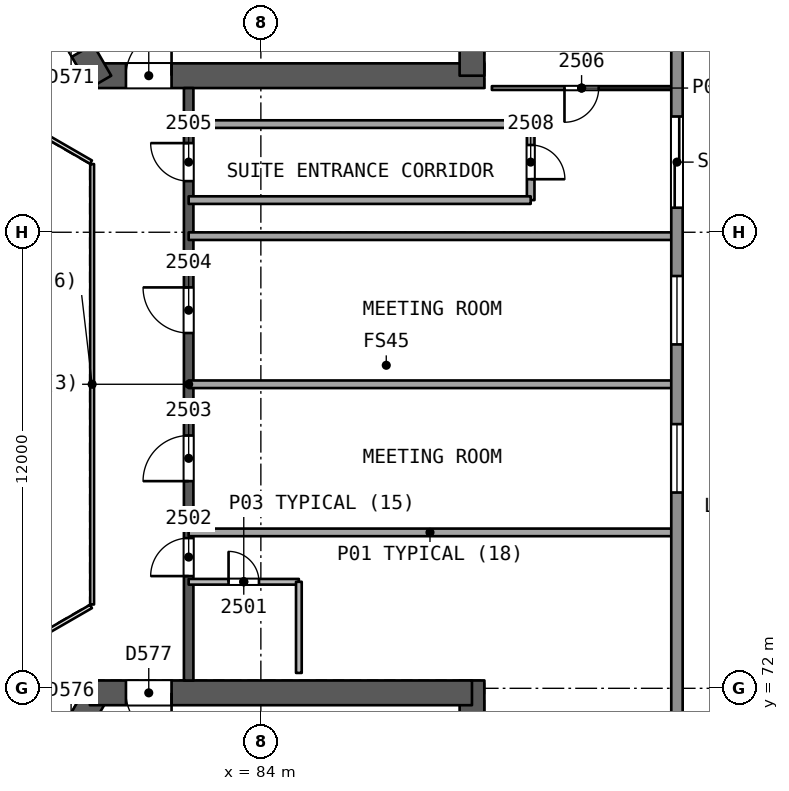
"""IFC4 building model, lengths in metres.
Left out: names, types, materials, properties, quantities, classifications, styles, units other than length and angle.
Written with IfcOpenShell. Run it as: python <this file> out.ifc"""

import sys

from ifc_helpers import new_model, si_unit, direction, frame, frame_2d, origin, place, context, subcontext, project, spatial, rectangle, extrude, element, fill, save


model = new_model("IFC4")
c1 = context("Model", 3, precision=1e-05, world=origin(), true_north=direction((0.0, 1.0)))
c2 = subcontext(c1, "Body", "Model", "MODEL_VIEW")
j1 = project(units=[si_unit("LENGTHUNIT", "METRE"), si_unit("PLANEANGLEUNIT", "RADIAN")], contexts=[c1])
p1 = place(None, origin())
s1 = spatial("IfcSite", under=j1, at=p1, CompositionType="ELEMENT")
p2 = place(p1, origin())
s2 = spatial("IfcBuilding", under=s1, at=p2, CompositionType="ELEMENT")
p3 = place(p2, frame((0.0, 0.0, 106.8)))
s3 = spatial("IfcBuildingStorey", under=s2, at=p3, CompositionType="ELEMENT", Elevation=106.8)
p4 = place(p3, frame((79.688, 88.119, 0.0), z_axis=(0.0, 0.0, 1.0), x_axis=(1.0, 0.0, 0.0)))
e1 = element("IfcWall", 1, at=p4, inside=s3, PredefinedType="SHEAR", context=c2, shape_type="SweptSolid", body=[
    extrude(rectangle(XDim=10.192, YDim=0.65, at=frame_2d((5.096, 0.0))), origin(), (0.0, 0.0, 1.0), 3.7),
])
p5 = place(p4, frame((0.762, 0.0, 0.0)))
e2 = element("IfcOpeningElement", 2, at=p5, cuts=e1, PredefinedType="OPENING", context=c2, shape_type="SweptSolid", body=[
    extrude(rectangle(XDim=1.2, YDim=2.1, at=frame_2d((0.6, 1.05))), frame((0.0, 0.335, 0.0), z_axis=(0.0, -1.0, 0.0), x_axis=(1.0, 0.0, 0.0)), (0.0, 0.0, 1.0), 0.671),
])
p6 = place(p3, frame((89.555, 88.119, 0.0), z_axis=(0.0, 0.0, 1.0), x_axis=(0.0, 1.0, 0.0)))
e3 = element("IfcWall", 3, at=p6, inside=s3, PredefinedType="SHEAR", context=c2, shape_type="SweptSolid", body=[
    extrude(rectangle(XDim=14.009, YDim=0.65, at=frame_2d((7.004, 0.0))), origin(), (0.0, 0.0, 1.0), 3.7),
])
p7 = place(p3, frame((74.754, 96.665, 0.0), z_axis=(0.0, 0.0, 1.0), x_axis=(0.500011799426, -0.866018591275, 0.0)))
e4 = element("IfcWall", 4, at=p7, inside=s3, PredefinedType="SHEAR", context=c2, shape_type="SweptSolid", body=[
    extrude(rectangle(XDim=10.055, YDim=0.65, at=frame_2d((5.027, 0.0))), origin(), (0.0, 0.0, 1.0), 3.7),
])
p8 = place(p7, frame((7.905, 0.0, 0.0)))
e5 = element("IfcOpeningElement", 5, at=p8, cuts=e4, PredefinedType="OPENING", context=c2, shape_type="SweptSolid", body=[
    extrude(rectangle(XDim=1.2, YDim=2.1, at=frame_2d((0.6, 1.05))), frame((0.0, 0.335, 0.0), z_axis=(0.0, -1.0, 0.0), x_axis=(1.0, 0.0, 0.0)), (0.0, 0.0, 1.0), 0.671),
])
p9 = place(p3, frame((79.688, 71.881, 0.0), z_axis=(0.0, 0.0, 1.0), x_axis=(-0.49999822179, -0.866026430432, 0.0)))
e6 = element("IfcWall", 6, at=p9, inside=s3, PredefinedType="SHEAR", context=c2, shape_type="SweptSolid", body=[
    extrude(rectangle(XDim=10.192, YDim=0.65, at=frame_2d((5.096, 0.0))), origin(), (0.0, 0.0, 1.0), 3.7),
])
p10 = place(p9, frame((0.762, 0.0, 0.0)))
e7 = element("IfcOpeningElement", 7, at=p10, cuts=e6, PredefinedType="OPENING", context=c2, shape_type="SweptSolid", body=[
    extrude(rectangle(XDim=1.2, YDim=2.1, at=frame_2d((0.6, 1.05))), frame((0.0, 0.335, 0.0), z_axis=(0.0, -1.0, 0.0), x_axis=(1.0, 0.0, 0.0)), (0.0, 0.0, 1.0), 0.671),
])
p11 = place(p3, frame((89.555, 58.06, 0.0), z_axis=(0.0, 0.0, 1.0), x_axis=(0.0, 1.0, 0.0)))
e8 = element("IfcWall", 8, at=p11, inside=s3, PredefinedType="SHEAR", context=c2, shape_type="SweptSolid", body=[
    extrude(rectangle(XDim=14.146, YDim=0.65, at=frame_2d((7.073, 0.0))), origin(), (0.0, 0.0, 1.0), 3.7),
])
p12 = place(p3, frame((89.555, 71.881, 0.0), z_axis=(0.0, 0.0, 1.0), x_axis=(-1.0, 0.0, 0.0)))
e9 = element("IfcWall", 9, at=p12, inside=s3, PredefinedType="SHEAR", context=c2, shape_type="SweptSolid", body=[
    extrude(rectangle(XDim=10.055, YDim=0.65, at=frame_2d((5.027, 0.0))), origin(), (0.0, 0.0, 1.0), 3.7),
])
p13 = place(p12, frame((7.905, 0.0, 0.0)))
e10 = element("IfcOpeningElement", 10, at=p13, cuts=e9, PredefinedType="OPENING", context=c2, shape_type="SweptSolid", body=[
    extrude(rectangle(XDim=1.2, YDim=2.1, at=frame_2d((0.6, 1.05))), frame((0.0, 0.335, 0.0), z_axis=(0.0, -1.0, 0.0), x_axis=(1.0, 0.0, 0.0)), (0.0, 0.0, 1.0), 0.671),
])
p14 = place(p3, frame((82.1, 72.206, 0.0), z_axis=(0.0, 0.0, 1.0), x_axis=(0.0, 1.0, 0.0)))
e11 = element("IfcWall", 11, at=p14, inside=s3, PredefinedType="SHEAR", context=c2, shape_type="SweptSolid", body=[
    extrude(rectangle(XDim=15.588, YDim=0.25, at=frame_2d((7.794, 0.0))), origin(), (0.0, 0.0, 1.0), 3.25),
])
p15 = place(p14, frame((2.747, 0.0, 0.0)))
e12 = element("IfcOpeningElement", 12, at=p15, cuts=e11, PredefinedType="OPENING", context=c2, shape_type="SweptSolid", body=[
    extrude(rectangle(XDim=1.0, YDim=2.1, at=frame_2d((0.5, 1.05))), frame((0.0, 0.135, 0.0), z_axis=(0.0, -1.0, 0.0), x_axis=(1.0, 0.0, 0.0)), (0.0, 0.0, 1.0), 0.271),
])
p16 = place(p14, frame((5.246, 0.0, 0.0)))
e13 = element("IfcOpeningElement", 13, at=p16, cuts=e11, PredefinedType="OPENING", context=c2, shape_type="SweptSolid", body=[
    extrude(rectangle(XDim=1.2, YDim=2.4, at=frame_2d((0.6, 1.2))), frame((0.0, 0.135, 0.0), z_axis=(0.0, -1.0, 0.0), x_axis=(1.0, 0.0, 0.0)), (0.0, 0.0, 1.0), 0.271),
])
p17 = place(p14, frame((9.143, 0.0, 0.0)))
e14 = element("IfcOpeningElement", 14, at=p17, cuts=e11, PredefinedType="OPENING", context=c2, shape_type="SweptSolid", body=[
    extrude(rectangle(XDim=1.2, YDim=2.4, at=frame_2d((0.6, 1.2))), frame((0.0, 0.135, 0.0), z_axis=(0.0, -1.0, 0.0), x_axis=(1.0, 0.0, 0.0)), (0.0, 0.0, 1.0), 0.271),
])
p18 = place(p14, frame((13.14, 0.0, 0.0)))
e15 = element("IfcOpeningElement", 15, at=p18, cuts=e11, PredefinedType="OPENING", context=c2, shape_type="SweptSolid", body=[
    extrude(rectangle(XDim=1.0, YDim=2.1, at=frame_2d((0.5, 1.05))), frame((0.0, 0.135, 0.0), z_axis=(0.0, -1.0, 0.0), x_axis=(1.0, 0.0, 0.0)), (0.0, 0.0, 1.0), 0.271),
])
p19 = place(p3, frame((82.1, 74.803, 0.0), z_axis=(0.0, 0.0, 1.0), x_axis=(1.0, 0.0, 0.0)))
e16 = element("IfcWall", 16, at=p19, inside=s3, PredefinedType="PARTITIONING", context=c2, shape_type="SweptSolid", body=[
    extrude(rectangle(XDim=2.9, YDim=0.15, at=frame_2d((1.45, 0.0))), origin(), (0.0, 0.0, 1.0), 3.25),
])
p20 = place(p19, frame((1.05, 0.0, 0.0)))
e17 = element("IfcOpeningElement", 17, at=p20, cuts=e16, PredefinedType="OPENING", context=c2, shape_type="SweptSolid", body=[
    extrude(rectangle(XDim=0.8, YDim=2.1, at=frame_2d((0.4, 1.05))), frame((0.0, 0.085, 0.0), z_axis=(0.0, -1.0, 0.0), x_axis=(1.0, 0.0, 0.0)), (0.0, 0.0, 1.0), 0.171),
])
p21 = place(p3, frame((85.0, 74.803, 0.0), z_axis=(0.0, 0.0, 1.0), x_axis=(0.0, -1.0, 0.0)))
e18 = element("IfcWall", 18, at=p21, inside=s3, PredefinedType="PARTITIONING", context=c2, shape_type="SweptSolid", body=[
    extrude(rectangle(XDim=2.398, YDim=0.15, at=frame_2d((1.199, 0.0))), origin(), (0.0, 0.0, 1.0), 3.25),
])
for number, where, z_axis, x_axis in (
    (19, (94.801, 76.103, 0.0), (0.0, 0.0, 1.0), (-1.0, 0.0, 0.0)),
    (20, (94.801, 80.0, 0.0), (0.0, 0.0, 1.0), (-1.0, 0.0, 0.0)),
    (21, (94.801, 83.897, 0.0), (0.0, 0.0, 1.0), (-1.0, 0.0, 0.0)),
):
    element("IfcWall", number, at=place(p3, frame(where, z_axis=z_axis, x_axis=x_axis)), inside=s3, PredefinedType="PARTITIONING", context=c2, shape_type="SweptSolid", body=[
        extrude(rectangle(XDim=12.7, YDim=0.2, at=frame_2d((6.35, 0.0))), origin(), (0.0, 0.0, 1.0), 3.25),
    ])
p22 = place(p3, frame((94.801, 87.794, 0.0), z_axis=(0.0, 0.0, 1.0), x_axis=(-1.0, 0.0, 0.0)))
e22 = element("IfcWall", 22, at=p22, inside=s3, PredefinedType="PARTITIONING", context=c2, shape_type="SweptSolid", body=[
    extrude(rectangle(XDim=4.721, YDim=0.1, at=frame_2d((2.361, 0.0))), origin(), (0.0, 0.0, 1.0), 3.25),
])
p23 = place(p22, frame((1.911, 0.0, 0.0)))
e23 = element("IfcOpeningElement", 23, at=p23, cuts=e22, PredefinedType="OPENING", context=c2, shape_type="SweptSolid", body=[
    extrude(rectangle(XDim=0.9, YDim=2.1, at=frame_2d((0.45, 1.05))), frame((0.0, 0.061, 0.0), z_axis=(0.0, -1.0, 0.0), x_axis=(1.0, 0.0, 0.0)), (0.0, 0.0, 1.0), 0.121),
])
p24 = place(p3, frame((82.1, 86.846, 0.0), z_axis=(0.0, 0.0, 1.0), x_axis=(1.0, 0.0, 0.0)))
e24 = element("IfcWall", 24, at=p24, inside=s3, PredefinedType="PARTITIONING", context=c2, shape_type="SweptSolid", body=[
    extrude(rectangle(XDim=9.0, YDim=0.2, at=frame_2d((4.5, 0.0))), origin(), (0.0, 0.0, 1.0), 3.25),
])
p25 = place(p3, frame((91.1, 86.846, 0.0), z_axis=(0.0, 0.0, 1.0), x_axis=(0.0, -1.0, 0.0)))
e25 = element("IfcWall", 25, at=p25, inside=s3, PredefinedType="PARTITIONING", context=c2, shape_type="SweptSolid", body=[
    extrude(rectangle(XDim=2.0, YDim=0.2, at=frame_2d((1.0, 0.0))), origin(), (0.0, 0.0, 1.0), 3.25),
])
p26 = place(p25, frame((0.55, 0.0, 0.0)))
e26 = element("IfcOpeningElement", 26, at=p26, cuts=e25, PredefinedType="OPENING", context=c2, shape_type="SweptSolid", body=[
    extrude(rectangle(XDim=0.9, YDim=2.1, at=frame_2d((0.45, 1.05))), frame((0.0, 0.11, 0.0), z_axis=(0.0, -1.0, 0.0), x_axis=(1.0, 0.0, 0.0)), (0.0, 0.0, 1.0), 0.221),
])
p27 = place(p3, frame((91.1, 84.846, 0.0), z_axis=(0.0, 0.0, 1.0), x_axis=(-1.0, 0.0, 0.0)))
e27 = element("IfcWall", 27, at=p27, inside=s3, PredefinedType="PARTITIONING", context=c2, shape_type="SweptSolid", body=[
    extrude(rectangle(XDim=9.0, YDim=0.2, at=frame_2d((4.5, 0.0))), origin(), (0.0, 0.0, 1.0), 3.25),
])
p28 = place(p3, frame((94.949, 108.684, 0.0), z_axis=(0.0, 0.0, 1.0), x_axis=(0.0, -1.0, 0.0)))
e28 = element("IfcWall", 28, at=p28, inside=s3, PredefinedType="SOLIDWALL", context=c2, shape_type="SweptSolid", body=[
    extrude(rectangle(XDim=57.367, YDim=0.3, at=frame_2d((28.684, 0.0))), origin(), (0.0, 0.0, 1.0), 3.25),
])
p29 = place(p28, frame((21.638, 0.0, 0.0)))
e29 = element("IfcOpeningElement", 29, at=p29, cuts=e28, PredefinedType="OPENING", context=c2, shape_type="SweptSolid", body=[
    extrude(rectangle(XDim=2.4, YDim=2.4, at=frame_2d((1.2, 1.2))), frame((0.0, 0.161, 0.0), z_axis=(0.0, -1.0, 0.0), x_axis=(1.0, 0.0, 0.0)), (0.0, 0.0, 1.0), 0.321),
])
p30 = place(p28, frame((10.48, 0.0, 0.0)))
e30 = element("IfcOpeningElement", 30, at=p30, cuts=e28, PredefinedType="OPENING", context=c2, shape_type="SweptSolid", body=[
    extrude(rectangle(XDim=2.4, YDim=2.4, at=frame_2d((1.2, 1.2))), frame((0.0, 0.161, 0.0), z_axis=(0.0, -1.0, 0.0), x_axis=(1.0, 0.0, 0.0)), (0.0, 0.0, 1.0), 0.321),
])
p31 = place(p28, frame((43.817, 0.0, 0.0)))
e31 = element("IfcOpeningElement", 31, at=p31, cuts=e28, PredefinedType="OPENING", context=c2, shape_type="SweptSolid", body=[
    extrude(rectangle(XDim=2.4, YDim=2.4, at=frame_2d((1.2, 1.2))), frame((0.0, 0.161, 0.0), z_axis=(0.0, -1.0, 0.0), x_axis=(1.0, 0.0, 0.0)), (0.0, 0.0, 1.0), 0.321),
])
p32 = place(p28, frame((29.732, 0.0, 0.9)))
e32 = element("IfcOpeningElement", 32, at=p32, cuts=e28, PredefinedType="OPENING", context=c2, shape_type="SweptSolid", body=[
    extrude(rectangle(XDim=1.8, YDim=1.5, at=frame_2d((0.9, 0.75))), frame((0.0, 0.161, 0.0), z_axis=(0.0, -1.0, 0.0), x_axis=(1.0, 0.0, 0.0)), (0.0, 0.0, 1.0), 0.321),
])
p33 = place(p28, frame((25.835, 0.0, 0.9)))
e33 = element("IfcOpeningElement", 33, at=p33, cuts=e28, PredefinedType="OPENING", context=c2, shape_type="SweptSolid", body=[
    extrude(rectangle(XDim=1.8, YDim=1.5, at=frame_2d((0.9, 0.75))), frame((0.0, 0.161, 0.0), z_axis=(0.0, -1.0, 0.0), x_axis=(1.0, 0.0, 0.0)), (0.0, 0.0, 1.0), 0.321),
])
p34 = place(p3, frame((40.185, 82.935, 0.0), z_axis=(0.0, 0.0, 1.0), x_axis=(0.866025206658, 0.500000341433, 0.0)))
e34 = element("IfcWall", 34, at=p34, inside=s3, PredefinedType="SOLIDWALL", context=c2, shape_type="SweptSolid", body=[
    extrude(rectangle(XDim=57.367, YDim=0.3, at=frame_2d((28.684, 0.0))), origin(), (0.0, 0.0, 1.0), 3.25),
])
p35 = place(p34, frame((23.586, 0.0, 0.0)))
e35 = element("IfcOpeningElement", 35, at=p35, cuts=e34, PredefinedType="OPENING", context=c2, shape_type="SweptSolid", body=[
    extrude(rectangle(XDim=2.4, YDim=2.4, at=frame_2d((1.2, 1.2))), frame((0.0, 0.161, 0.0), z_axis=(0.0, -1.0, 0.0), x_axis=(1.0, 0.0, 0.0)), (0.0, 0.0, 1.0), 0.321),
])
p36 = place(p34, frame((10.48, 0.0, 0.0)))
e36 = element("IfcOpeningElement", 36, at=p36, cuts=e34, PredefinedType="OPENING", context=c2, shape_type="SweptSolid", body=[
    extrude(rectangle(XDim=2.4, YDim=2.4, at=frame_2d((1.2, 1.2))), frame((0.0, 0.161, 0.0), z_axis=(0.0, -1.0, 0.0), x_axis=(1.0, 0.0, 0.0)), (0.0, 0.0, 1.0), 0.321),
])
p37 = place(p34, frame((41.869, 0.0, 0.0)))
e37 = element("IfcOpeningElement", 37, at=p37, cuts=e34, PredefinedType="OPENING", context=c2, shape_type="SweptSolid", body=[
    extrude(rectangle(XDim=2.4, YDim=2.4, at=frame_2d((1.2, 1.2))), frame((0.0, 0.161, 0.0), z_axis=(0.0, -1.0, 0.0), x_axis=(1.0, 0.0, 0.0)), (0.0, 0.0, 1.0), 0.321),
])
p38 = place(p3, frame((89.866, 48.381, 0.0), z_axis=(0.0, 0.0, 1.0), x_axis=(-0.866025206658, 0.500000341433, 0.0)))
e38 = element("IfcWall", 38, at=p38, inside=s3, PredefinedType="SOLIDWALL", context=c2, shape_type="SweptSolid", body=[
    extrude(rectangle(XDim=57.367, YDim=0.3, at=frame_2d((28.684, 0.0))), origin(), (0.0, 0.0, 1.0), 3.25),
])
p39 = place(p38, frame((22.339, 0.0, 0.0)))
e39 = element("IfcOpeningElement", 39, at=p39, cuts=e38, PredefinedType="OPENING", context=c2, shape_type="SweptSolid", body=[
    extrude(rectangle(XDim=2.4, YDim=2.4, at=frame_2d((1.2, 1.2))), frame((0.0, 0.161, 0.0), z_axis=(0.0, -1.0, 0.0), x_axis=(1.0, 0.0, 0.0)), (0.0, 0.0, 1.0), 0.321),
])
p40 = place(p38, frame((10.48, 0.0, 0.0)))
e40 = element("IfcOpeningElement", 40, at=p40, cuts=e38, PredefinedType="OPENING", context=c2, shape_type="SweptSolid", body=[
    extrude(rectangle(XDim=2.4, YDim=2.4, at=frame_2d((1.2, 1.2))), frame((0.0, 0.161, 0.0), z_axis=(0.0, -1.0, 0.0), x_axis=(1.0, 0.0, 0.0)), (0.0, 0.0, 1.0), 0.321),
])
p41 = place(p38, frame((43.116, 0.0, 0.0)))
e41 = element("IfcOpeningElement", 41, at=p41, cuts=e38, PredefinedType="OPENING", context=c2, shape_type="SweptSolid", body=[
    extrude(rectangle(XDim=2.4, YDim=2.4, at=frame_2d((1.2, 1.2))), frame((0.0, 0.161, 0.0), z_axis=(0.0, -1.0, 0.0), x_axis=(1.0, 0.0, 0.0)), (0.0, 0.0, 1.0), 0.321),
])
p42 = place(p38, frame((27.783, 0.0, 0.9)))
e42 = element("IfcOpeningElement", 42, at=p42, cuts=e38, PredefinedType="OPENING", context=c2, shape_type="SweptSolid", body=[
    extrude(rectangle(XDim=1.8, YDim=1.5, at=frame_2d((0.9, 0.75))), frame((0.0, 0.161, 0.0), z_axis=(0.0, -1.0, 0.0), x_axis=(1.0, 0.0, 0.0)), (0.0, 0.0, 1.0), 0.321),
])
p43 = place(p3, frame((79.56, 74.206, 0.0), z_axis=(0.0, 0.0, 1.0), x_axis=(0.0, 1.0, 0.0)))
e43 = element("IfcWall", 43, at=p43, inside=s3, PredefinedType="PARTITIONING", context=c2, shape_type="SweptSolid", body=[
    extrude(rectangle(XDim=11.588, YDim=0.1, at=frame_2d((5.794, 0.0))), origin(), (0.0, 0.0, 1.0), 3.25),
])
for number, where, z_axis, x_axis in (
    (44, (79.53, 85.846, 0.0), (0.0, 0.0, 1.0), (-0.866, 0.5, 0.0)),
    (45, (77.798, 73.154, 0.0), (0.0, 0.0, 1.0), (0.866, 0.5, 0.0)),
):
    element("IfcWall", number, at=place(p3, frame(where, z_axis=z_axis, x_axis=x_axis)), inside=s3, PredefinedType="PARTITIONING", context=c2, shape_type="SweptSolid", body=[
        extrude(rectangle(XDim=2.0, YDim=0.1, at=frame_2d((1.0, 0.0))), origin(), (0.0, 0.0, 1.0), 3.25),
    ])
p44 = place(p20, origin())
e46 = element("IfcDoor", 46, at=p44, inside=s3, OperationType="SINGLE_SWING_LEFT", PredefinedType="NOTDEFINED", context=c2, shape_type="SweptSolid", body=[
    extrude(rectangle(XDim=0.8, YDim=2.1, at=frame_2d((0.4, 1.05))), frame((0.0, 0.025, 0.0), z_axis=(0.0, -1.0, 0.0), x_axis=(1.0, 0.0, 0.0)), (0.0, 0.0, 1.0), 0.05),
])
fill(e17, e46)
p45 = place(p15, origin())
e47 = element("IfcDoor", 47, at=p45, inside=s3, OperationType="SINGLE_SWING_LEFT", PredefinedType="NOTDEFINED", context=c2, shape_type="SweptSolid", body=[
    extrude(rectangle(XDim=1.0, YDim=2.1, at=frame_2d((0.5, 1.05))), frame((0.0, 0.025, 0.0), z_axis=(0.0, -1.0, 0.0), x_axis=(1.0, 0.0, 0.0)), (0.0, 0.0, 1.0), 0.05),
])
fill(e12, e47)
p46 = place(p16, origin())
e48 = element("IfcDoor", 48, at=p46, inside=s3, OperationType="SINGLE_SWING_LEFT", PredefinedType="NOTDEFINED", context=c2, shape_type="SweptSolid", body=[
    extrude(rectangle(XDim=1.2, YDim=2.4, at=frame_2d((0.6, 1.2))), frame((0.0, 0.025, 0.0), z_axis=(0.0, -1.0, 0.0), x_axis=(1.0, 0.0, 0.0)), (0.0, 0.0, 1.0), 0.05),
])
fill(e13, e48)
p47 = place(p17, origin())
e49 = element("IfcDoor", 49, at=p47, inside=s3, OperationType="SINGLE_SWING_RIGHT", PredefinedType="NOTDEFINED", context=c2, shape_type="SweptSolid", body=[
    extrude(rectangle(XDim=1.2, YDim=2.4, at=frame_2d((0.6, 1.2))), frame((0.0, 0.025, 0.0), z_axis=(0.0, -1.0, 0.0), x_axis=(1.0, 0.0, 0.0)), (0.0, 0.0, 1.0), 0.05),
])
fill(e14, e49)
p48 = place(p18, origin())
e50 = element("IfcDoor", 50, at=p48, inside=s3, OperationType="SINGLE_SWING_RIGHT", PredefinedType="NOTDEFINED", context=c2, shape_type="SweptSolid", body=[
    extrude(rectangle(XDim=1.0, YDim=2.1, at=frame_2d((0.5, 1.05))), frame((0.0, 0.025, 0.0), z_axis=(0.0, -1.0, 0.0), x_axis=(1.0, 0.0, 0.0)), (0.0, 0.0, 1.0), 0.05),
])
fill(e15, e50)
p49 = place(p23, origin())
e51 = element("IfcDoor", 51, at=p49, inside=s3, OperationType="SINGLE_SWING_RIGHT", PredefinedType="NOTDEFINED", context=c2, shape_type="SweptSolid", body=[
    extrude(rectangle(XDim=0.9, YDim=2.1, at=frame_2d((0.45, 1.05))), frame((0.0, 0.025, 0.0), z_axis=(0.0, -1.0, 0.0), x_axis=(1.0, 0.0, 0.0)), (0.0, 0.0, 1.0), 0.05),
])
fill(e23, e51)
p50 = place(p26, origin())
e52 = element("IfcDoor", 52, at=p50, inside=s3, OperationType="SINGLE_SWING_RIGHT", PredefinedType="NOTDEFINED", context=c2, shape_type="SweptSolid", body=[
    extrude(rectangle(XDim=0.9, YDim=2.1, at=frame_2d((0.45, 1.05))), frame((0.0, 0.025, 0.0), z_axis=(0.0, -1.0, 0.0), x_axis=(1.0, 0.0, 0.0)), (0.0, 0.0, 1.0), 0.05),
])
fill(e26, e52)
p51 = place(p29, origin())
e53 = element("IfcDoor", 53, at=p51, inside=s3, OperationType="SLIDING_TO_LEFT", PredefinedType="NOTDEFINED", context=c2, shape_type="SweptSolid", body=[
    extrude(rectangle(XDim=2.4, YDim=2.4, at=frame_2d((1.2, 1.2))), frame((0.0, 0.025, 0.0), z_axis=(0.0, -1.0, 0.0), x_axis=(1.0, 0.0, 0.0)), (0.0, 0.0, 1.0), 0.05),
])
fill(e29, e53)
p52 = place(p32, origin())
e54 = element("IfcWindow", 54, at=p52, inside=s3, PartitioningType="SINGLE_PANEL", PredefinedType="WINDOW", context=c2, shape_type="SweptSolid", body=[
    extrude(rectangle(XDim=1.8, YDim=1.5, at=frame_2d((0.9, 0.75))), frame((0.0, 0.03, 0.0), z_axis=(0.0, -1.0, 0.0), x_axis=(1.0, 0.0, 0.0)), (0.0, 0.0, 1.0), 0.06),
])
fill(e32, e54)
p53 = place(p33, origin())
e55 = element("IfcWindow", 55, at=p53, inside=s3, PartitioningType="SINGLE_PANEL", PredefinedType="WINDOW", context=c2, shape_type="SweptSolid", body=[
    extrude(rectangle(XDim=1.8, YDim=1.5, at=frame_2d((0.9, 0.75))), frame((0.0, 0.03, 0.0), z_axis=(0.0, -1.0, 0.0), x_axis=(1.0, 0.0, 0.0)), (0.0, 0.0, 1.0), 0.06),
])
fill(e33, e55)
p54 = place(p5, origin())
e56 = element("IfcDoor", 56, at=p54, inside=s3, OperationType="SINGLE_SWING_RIGHT", PredefinedType="NOTDEFINED", context=c2, shape_type="SweptSolid", body=[
    extrude(rectangle(XDim=1.2, YDim=2.1, at=frame_2d((0.6, 1.05))), frame((0.0, 0.025, 0.0), z_axis=(0.0, -1.0, 0.0), x_axis=(1.0, 0.0, 0.0)), (0.0, 0.0, 1.0), 0.05),
])
fill(e2, e56)
p55 = place(p13, origin())
e57 = element("IfcDoor", 57, at=p55, inside=s3, OperationType="SINGLE_SWING_LEFT", PredefinedType="NOTDEFINED", context=c2, shape_type="SweptSolid", body=[
    extrude(rectangle(XDim=1.2, YDim=2.1, at=frame_2d((0.6, 1.05))), frame((0.0, 0.025, 0.0), z_axis=(0.0, -1.0, 0.0), x_axis=(1.0, 0.0, 0.0)), (0.0, 0.0, 1.0), 0.05),
])
fill(e10, e57)
save(model, sys.argv[1])
